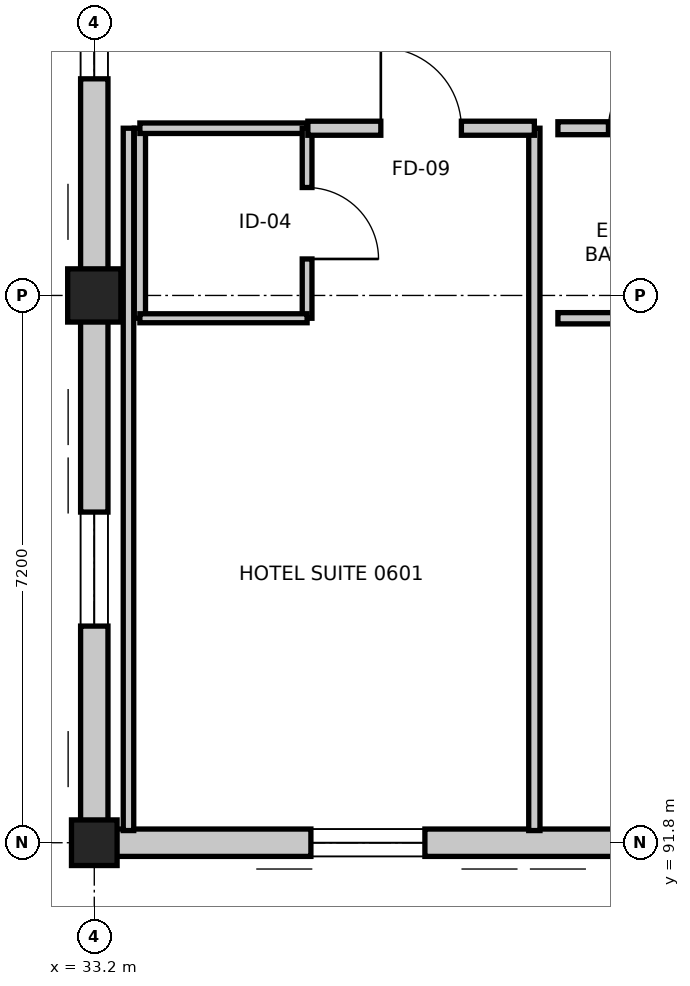
"""IFC4 building model, lengths in metres.
Left out: names, types, materials, properties, quantities, classifications, styles, units other than length and angle.
Written with IfcOpenShell. Run it as: python <this file> out.ifc"""

import sys

from ifc_helpers import new_model, si_unit, direction, frame, frame_2d, origin, origin_2d, place, context, subcontext, project, spatial, rectangle, extrude, element, fill, save


model = new_model("IFC4")
c1 = context("Model", 3, precision=1e-05, world=origin(), true_north=direction((0.0, 1.0)))
c2 = subcontext(c1, "Body", "Model", "MODEL_VIEW")
j1 = project(units=[si_unit("LENGTHUNIT", "METRE"), si_unit("PLANEANGLEUNIT", "RADIAN")], contexts=[c1])
p1 = place(None, origin())
s1 = spatial("IfcSite", under=j1, at=p1, CompositionType="ELEMENT")
p2 = place(p1, origin())
s2 = spatial("IfcBuilding", under=s1, at=p2, CompositionType="ELEMENT")
p3 = place(p2, frame((0.0, 0.0, 26.4)))
s3 = spatial("IfcBuildingStorey", under=s2, at=p3, CompositionType="ELEMENT", Elevation=26.4)
p4 = place(p3, frame((33.2, 91.8, 0.0), z_axis=(0.0, 0.0, 1.0), x_axis=(1.0, 0.0, 0.0)))
e1 = element("IfcColumn", 1, at=p4, inside=s3, PredefinedType="COLUMN", context=c2, shape_type="SweptSolid", body=[
    extrude(rectangle(XDim=0.6, YDim=0.6, at=origin_2d()), origin(), (0.0, 0.0, 1.0), 3.6),
])
p5 = place(p3, frame((33.2, 99.0, 0.0), z_axis=(0.0, 0.0, 1.0), x_axis=(1.0, 0.0, 0.0)))
e2 = element("IfcColumn", 2, at=p5, inside=s3, PredefinedType="COLUMN", context=c2, shape_type="SweptSolid", body=[
    extrude(rectangle(XDim=0.7, YDim=0.7, at=origin_2d()), origin(), (0.0, 0.0, 1.0), 3.6),
])
p6 = place(p3, frame((40.4, 91.8, 0.0), z_axis=(0.0, 0.0, 1.0), x_axis=(-1.0, 0.0, 0.0)))
e3 = element("IfcWall", 3, at=p6, inside=s3, PredefinedType="STANDARD", context=c2, shape_type="SweptSolid", body=[
    extrude(rectangle(XDim=7.2, YDim=0.36, at=frame_2d((3.6, 0.0))), origin(), (0.0, 0.0, 1.0), 2.735),
])
p7 = place(p6, frame((2.85, 0.0, 0.75)))
e4 = element("IfcOpeningElement", 4, at=p7, cuts=e3, PredefinedType="OPENING", context=c2, shape_type="SweptSolid", body=[
    extrude(rectangle(XDim=1.5, YDim=1.5, at=frame_2d((0.75, 0.75))), frame((0.0, 0.19, 0.0), z_axis=(0.0, -1.0, 0.0), x_axis=(1.0, 0.0, 0.0)), (0.0, 0.0, 1.0), 0.38),
])
p8 = place(p3, frame((33.2, 91.8, 0.0), z_axis=(0.0, 0.0, 1.0), x_axis=(0.0, 1.0, 0.0)))
e5 = element("IfcWall", 5, at=p8, inside=s3, PredefinedType="STANDARD", context=c2, shape_type="SweptSolid", body=[
    extrude(rectangle(XDim=7.2, YDim=0.36, at=frame_2d((3.6, 0.0))), origin(), (0.0, 0.0, 1.0), 2.685),
])
p9 = place(p8, frame((2.85, 0.0, 0.75)))
e6 = element("IfcOpeningElement", 6, at=p9, cuts=e5, PredefinedType="OPENING", context=c2, shape_type="SweptSolid", body=[
    extrude(rectangle(XDim=1.5, YDim=1.5, at=frame_2d((0.75, 0.75))), frame((0.0, 0.19, 0.0), z_axis=(0.0, -1.0, 0.0), x_axis=(1.0, 0.0, 0.0)), (0.0, 0.0, 1.0), 0.38),
])
p10 = place(p3, frame((33.2, 99.0, 0.0), z_axis=(0.0, 0.0, 1.0), x_axis=(0.0, 1.0, 0.0)))
e7 = element("IfcWall", 7, at=p10, inside=s3, PredefinedType="STANDARD", context=c2, shape_type="SweptSolid", body=[
    extrude(rectangle(XDim=7.2, YDim=0.36, at=frame_2d((3.6, 0.0))), origin(), (0.0, 0.0, 1.0), 2.685),
])
p11 = place(p10, frame((2.85, 0.0, 0.75)))
e8 = element("IfcOpeningElement", 8, at=p11, cuts=e7, PredefinedType="OPENING", context=c2, shape_type="SweptSolid", body=[
    extrude(rectangle(XDim=1.5, YDim=1.5, at=frame_2d((0.75, 0.75))), frame((0.0, 0.19, 0.0), z_axis=(0.0, -1.0, 0.0), x_axis=(1.0, 0.0, 0.0)), (0.0, 0.0, 1.0), 0.38),
])
p12 = place(p3, frame((33.8, 98.7, 0.0), z_axis=(0.0, 0.0, 1.0), x_axis=(0.0, 1.0, 0.0)))
e9 = element("IfcWall", 9, at=p12, inside=s3, PredefinedType="PARTITIONING", context=c2, shape_type="SweptSolid", body=[
    extrude(rectangle(XDim=2.5, YDim=0.148, at=frame_2d((1.25, 0.0))), origin(), (0.0, 0.0, 1.0), 2.735),
])
p13 = place(p3, frame((33.8, 101.2, 0.0), z_axis=(0.0, 0.0, 1.0), x_axis=(1.0, 0.0, 0.0)))
e10 = element("IfcWall", 10, at=p13, inside=s3, PredefinedType="PARTITIONING", context=c2, shape_type="SweptSolid", body=[
    extrude(rectangle(XDim=2.2, YDim=0.138, at=frame_2d((1.1, 0.0))), origin(), (0.0, 0.0, 1.0), 3.35),
])
p14 = place(p3, frame((36.0, 101.2, 0.0), z_axis=(0.0, 0.0, 1.0), x_axis=(0.0, -1.0, 0.0)))
e11 = element("IfcWall", 11, at=p14, inside=s3, PredefinedType="PARTITIONING", context=c2, shape_type="SweptSolid", body=[
    extrude(rectangle(XDim=2.5, YDim=0.128, at=frame_2d((1.25, 0.0))), origin(), (0.0, 0.0, 1.0), 2.735),
])
p15 = place(p14, frame((0.78, 0.0, 0.0)))
e12 = element("IfcOpeningElement", 12, at=p15, cuts=e11, PredefinedType="OPENING", context=c2, shape_type="SweptSolid", body=[
    extrude(rectangle(XDim=0.94, YDim=2.12, at=frame_2d((0.47, 1.06))), frame((0.0, 0.074, 0.0), z_axis=(0.0, -1.0, 0.0), x_axis=(1.0, 0.0, 0.0)), (0.0, 0.0, 1.0), 0.148),
])
p16 = place(p3, frame((36.0, 98.7, 0.0), z_axis=(0.0, 0.0, 1.0), x_axis=(-1.0, 0.0, 0.0)))
e13 = element("IfcWall", 13, at=p16, inside=s3, PredefinedType="PARTITIONING", context=c2, shape_type="SweptSolid", body=[
    extrude(rectangle(XDim=2.2, YDim=0.118, at=frame_2d((1.1, 0.0))), origin(), (0.0, 0.0, 1.0), 3.35),
])
p17 = place(p3, frame((38.99, 101.2, 0.0), z_axis=(0.0, 0.0, 1.0), x_axis=(0.0, -1.0, 0.0)))
e14 = element("IfcWall", 14, at=p17, inside=s3, PredefinedType="PARTITIONING", context=c2, shape_type="SweptSolid", body=[
    extrude(rectangle(XDim=9.24, YDim=0.148, at=frame_2d((4.62, 0.0))), origin(), (0.0, 0.0, 1.0), 2.735),
])
p18 = place(p3, frame((33.65, 91.96, 0.0), z_axis=(0.0, 0.0, 1.0), x_axis=(0.0, 1.0, 0.0)))
e15 = element("IfcWall", 15, at=p18, inside=s3, PredefinedType="PARTITIONING", context=c2, shape_type="SweptSolid", body=[
    extrude(rectangle(XDim=9.24, YDim=0.138, at=frame_2d((4.62, 0.0))), origin(), (0.0, 0.0, 1.0), 2.735),
])
p19 = place(p3, frame((36.01, 101.2, 0.0), z_axis=(0.0, 0.0, 1.0), x_axis=(1.0, 0.0, 0.0)))
e16 = element("IfcWall", 16, at=p19, inside=s3, PredefinedType="PARTITIONING", context=c2, shape_type="SweptSolid", body=[
    extrude(rectangle(XDim=2.98, YDim=0.185, at=frame_2d((1.49, 0.0))), origin(), (0.0, 0.0, 1.0), 3.35),
])
p20 = place(p19, frame((0.96, 0.0, 0.0)))
e17 = element("IfcOpeningElement", 17, at=p20, cuts=e16, PredefinedType="OPENING", context=c2, shape_type="SweptSolid", body=[
    extrude(rectangle(XDim=1.06, YDim=2.2, at=frame_2d((0.53, 1.1))), frame((0.0, 0.103, 0.0), z_axis=(0.0, -1.0, 0.0), x_axis=(1.0, 0.0, 0.0)), (0.0, 0.0, 1.0), 0.205),
])
p21 = place(p3, frame((39.3, 101.2, 0.0), z_axis=(0.0, 0.0, 1.0), x_axis=(1.0, 0.0, 0.0)))
e18 = element("IfcWall", 18, at=p21, inside=s3, PredefinedType="PARTITIONING", context=c2, shape_type="SweptSolid", body=[
    extrude(rectangle(XDim=2.2, YDim=0.17, at=frame_2d((1.1, 0.0))), origin(), (0.0, 0.0, 1.0), 2.685),
])
p22 = place(p21, frame((0.665, 0.0, 0.0)))
e19 = element("IfcOpeningElement", 19, at=p22, cuts=e18, PredefinedType="OPENING", context=c2, shape_type="SweptSolid", body=[
    extrude(rectangle(XDim=0.87, YDim=2.07, at=frame_2d((0.435, 1.035))), frame((0.0, 0.095, 0.0), z_axis=(0.0, -1.0, 0.0), x_axis=(1.0, 0.0, 0.0)), (0.0, 0.0, 1.0), 0.19),
])
p23 = place(p3, frame((41.5, 98.7, 0.0), z_axis=(0.0, 0.0, 1.0), x_axis=(-1.0, 0.0, 0.0)))
e20 = element("IfcWall", 20, at=p23, inside=s3, PredefinedType="PARTITIONING", context=c2, shape_type="SweptSolid", body=[
    extrude(rectangle(XDim=2.2, YDim=0.148, at=frame_2d((1.1, 0.0))), origin(), (0.0, 0.0, 1.0), 2.685),
])
p24 = place(p7, origin())
e21 = element("IfcWindow", 21, at=p24, inside=s3, PartitioningType="SINGLE_PANEL", PredefinedType="WINDOW", context=c2, shape_type="SweptSolid", body=[
    extrude(rectangle(XDim=1.5, YDim=1.5, at=frame_2d((0.75, 0.75))), frame((0.0, 0.03, 0.0), z_axis=(0.0, -1.0, 0.0), x_axis=(1.0, 0.0, 0.0)), (0.0, 0.0, 1.0), 0.06),
])
fill(e4, e21)
p25 = place(p9, origin())
e22 = element("IfcWindow", 22, at=p25, inside=s3, PartitioningType="SINGLE_PANEL", PredefinedType="WINDOW", context=c2, shape_type="SweptSolid", body=[
    extrude(rectangle(XDim=1.5, YDim=1.5, at=frame_2d((0.75, 0.75))), frame((0.0, 0.03, 0.0), z_axis=(0.0, -1.0, 0.0), x_axis=(1.0, 0.0, 0.0)), (0.0, 0.0, 1.0), 0.06),
])
fill(e6, e22)
p26 = place(p11, origin())
e23 = element("IfcWindow", 23, at=p26, inside=s3, PartitioningType="SINGLE_PANEL", PredefinedType="WINDOW", context=c2, shape_type="SweptSolid", body=[
    extrude(rectangle(XDim=1.5, YDim=1.5, at=frame_2d((0.75, 0.75))), frame((0.0, 0.03, 0.0), z_axis=(0.0, -1.0, 0.0), x_axis=(1.0, 0.0, 0.0)), (0.0, 0.0, 1.0), 0.06),
])
fill(e8, e23)
p27 = place(p15, origin())
e24 = element("IfcDoor", 24, at=p27, inside=s3, OperationType="SINGLE_SWING_RIGHT", PredefinedType="DOOR", context=c2, shape_type="SweptSolid", body=[
    extrude(rectangle(XDim=0.94, YDim=2.12, at=frame_2d((0.47, 1.06))), frame((0.0, 0.025, 0.0), z_axis=(0.0, -1.0, 0.0), x_axis=(1.0, 0.0, 0.0)), (0.0, 0.0, 1.0), 0.05),
])
fill(e12, e24)
p28 = place(p20, origin())
e25 = element("IfcDoor", 25, at=p28, inside=s3, OperationType="SINGLE_SWING_LEFT", PredefinedType="DOOR", context=c2, shape_type="SweptSolid", body=[
    extrude(rectangle(XDim=1.06, YDim=2.2, at=frame_2d((0.53, 1.1))), frame((0.0, 0.025, 0.0), z_axis=(0.0, -1.0, 0.0), x_axis=(1.0, 0.0, 0.0)), (0.0, 0.0, 1.0), 0.05),
])
fill(e17, e25)
p29 = place(p22, origin())
e26 = element("IfcDoor", 26, at=p29, inside=s3, OperationType="SINGLE_SWING_RIGHT", PredefinedType="DOOR", context=c2, shape_type="SweptSolid", body=[
    extrude(rectangle(XDim=0.87, YDim=2.07, at=frame_2d((0.435, 1.035))), frame((0.0, 0.025, 0.0), z_axis=(0.0, -1.0, 0.0), x_axis=(1.0, 0.0, 0.0)), (0.0, 0.0, 1.0), 0.05),
])
fill(e19, e26)
save(model, sys.argv[1])
